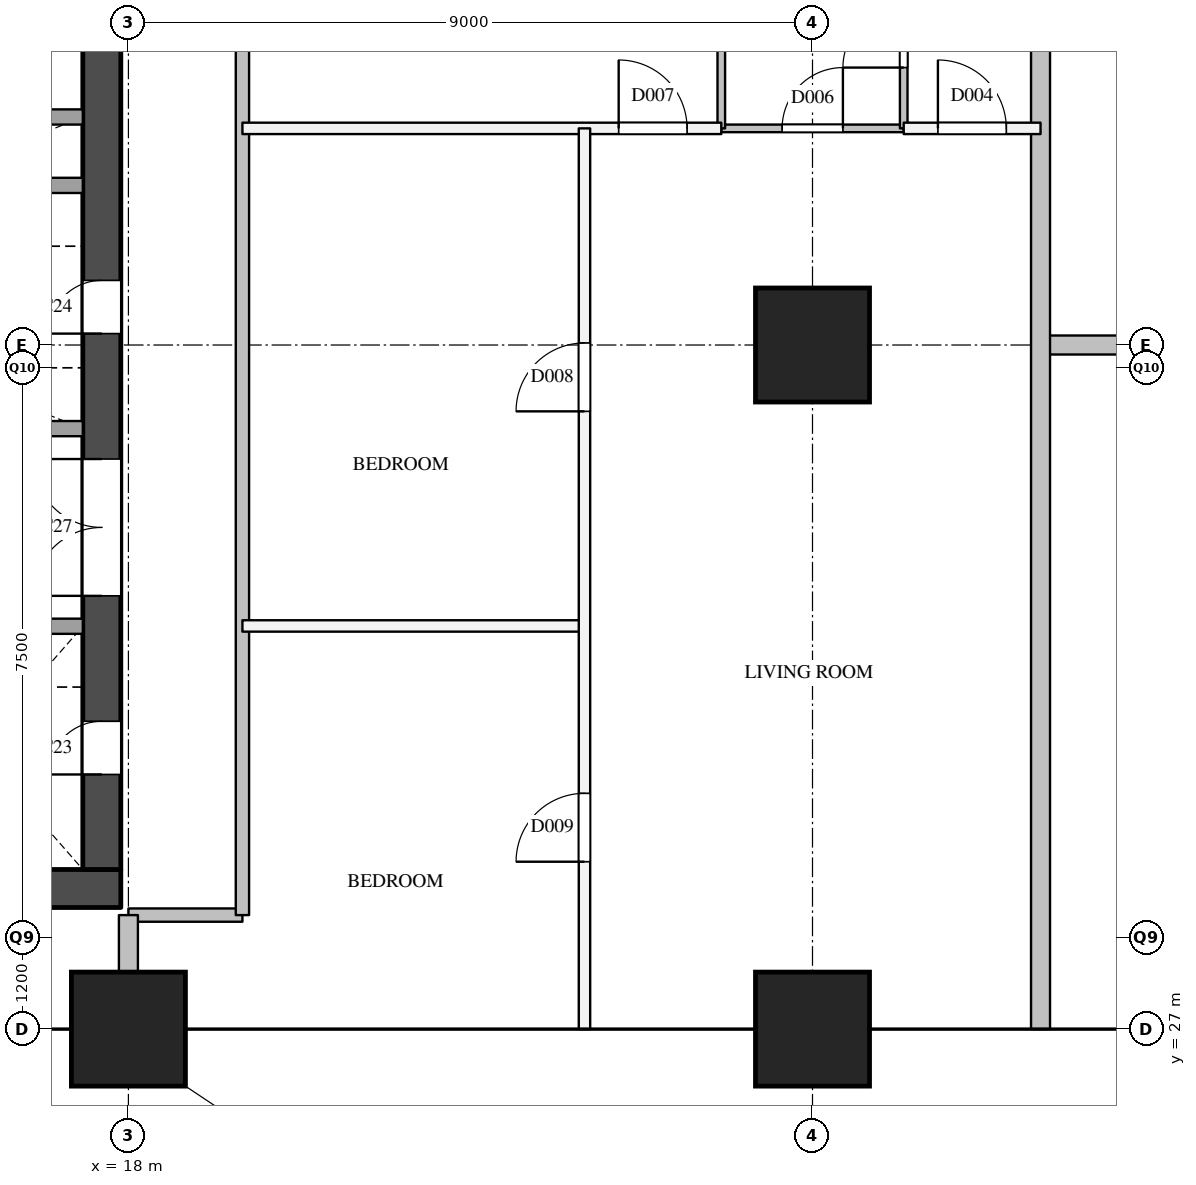
"""IFC4 building model, lengths in metres.
Left out: names, types, materials, properties, quantities, classifications, styles, units other than length and angle.
Written with IfcOpenShell. Run it as: python <this file> out.ifc"""

import sys

from ifc_helpers import new_model, si_unit, direction, frame, frame_2d, origin, origin_2d, place, context, subcontext, project, spatial, rectangle, extrude, element, fill, save


model = new_model("IFC4")
c1 = context("Model", 3, precision=1e-05, world=origin(), true_north=direction((0.0, 1.0)))
c2 = subcontext(c1, "Body", "Model", "MODEL_VIEW")
j1 = project(units=[si_unit("LENGTHUNIT", "METRE"), si_unit("PLANEANGLEUNIT", "RADIAN")], contexts=[c1])
p1 = place(None, origin())
s1 = spatial("IfcSite", under=j1, at=p1, CompositionType="ELEMENT")
p2 = place(p1, origin())
s2 = spatial("IfcBuilding", under=s1, at=p2, CompositionType="ELEMENT")
p3 = place(p2, frame((0.0, 0.0, 158.3)))
s3 = spatial("IfcBuildingStorey", under=s2, at=p3, CompositionType="ELEMENT", Elevation=158.3)
for number, where, z_axis, x_axis in (
    (1, (18.0, 27.0, 0.0), (0.0, 0.0, 1.0), (1.0, 0.0, 0.0)),
    (2, (27.0, 27.0, 0.0), (0.0, 0.0, 1.0), (1.0, 0.0, 0.0)),
    (3, (27.0, 36.0, 0.0), (0.0, 0.0, 1.0), (1.0, 0.0, 0.0)),
):
    element("IfcColumn", number, at=place(p3, frame(where, z_axis=z_axis, x_axis=x_axis)), inside=s3, PredefinedType="COLUMN", context=c2, shape_type="SweptSolid", body=[
        extrude(rectangle(XDim=1.5, YDim=1.5, at=origin_2d()), origin(), (0.0, 0.0, 1.0), 3.9),
    ])
p4 = place(p3, frame((5.7, 28.85, 0.0), z_axis=(0.0, 0.0, 1.0), x_axis=(1.0, 0.0, 0.0)))
e4 = element("IfcWall", 4, at=p4, inside=s3, PredefinedType="SHEAR", context=c2, shape_type="SweptSolid", body=[
    extrude(rectangle(XDim=12.2, YDim=0.5, at=frame_2d((6.1, 0.0))), origin(), (0.0, 0.0, 1.0), 3.6),
])
p5 = place(p4, frame((9.35, 0.0, 0.0)))
e5 = element("IfcOpeningElement", 5, at=p5, cuts=e4, PredefinedType="OPENING", context=c2, shape_type="SweptSolid", body=[
    extrude(rectangle(XDim=1.2, YDim=2.1, at=frame_2d((0.6, 1.05))), frame((0.0, 0.26, 0.0), z_axis=(0.0, -1.0, 0.0), x_axis=(1.0, 0.0, 0.0)), (0.0, 0.0, 1.0), 0.52),
])
p6 = place(p3, frame((17.65, 29.1, 0.0), z_axis=(0.0, 0.0, 1.0), x_axis=(0.0, 1.0, 0.0)))
e6 = element("IfcWall", 6, at=p6, inside=s3, PredefinedType="SHEAR", context=c2, shape_type="SweptSolid", body=[
    extrude(rectangle(XDim=20.3, YDim=0.5, at=frame_2d((10.15, 0.0))), origin(), (0.0, 0.0, 1.0), 3.6),
])
p7 = place(p6, frame((1.25, 0.0, 0.0)))
e7 = element("IfcOpeningElement", 7, at=p7, cuts=e6, PredefinedType="OPENING", context=c2, shape_type="SweptSolid", body=[
    extrude(rectangle(XDim=0.7, YDim=2.1, at=frame_2d((0.35, 1.05))), frame((0.0, 0.26, 0.0), z_axis=(0.0, -1.0, 0.0), x_axis=(1.0, 0.0, 0.0)), (0.0, 0.0, 1.0), 0.52),
])
p8 = place(p6, frame((7.05, 0.0, 0.0)))
e8 = element("IfcOpeningElement", 8, at=p8, cuts=e6, PredefinedType="OPENING", context=c2, shape_type="SweptSolid", body=[
    extrude(rectangle(XDim=0.7, YDim=2.1, at=frame_2d((0.35, 1.05))), frame((0.0, 0.26, 0.0), z_axis=(0.0, -1.0, 0.0), x_axis=(1.0, 0.0, 0.0)), (0.0, 0.0, 1.0), 0.52),
])
p9 = place(p6, frame((3.6, 0.0, 0.0)))
e9 = element("IfcOpeningElement", 9, at=p9, cuts=e6, PredefinedType="OPENING", context=c2, shape_type="SweptSolid", body=[
    extrude(rectangle(XDim=1.8, YDim=2.1, at=frame_2d((0.9, 1.05))), frame((0.0, 0.26, 0.0), z_axis=(0.0, -1.0, 0.0), x_axis=(1.0, 0.0, 0.0)), (0.0, 0.0, 1.0), 0.52),
])
for number, where, z_axis, x_axis in (
    (10, (14.6, 32.3, 0.0), (0.0, 0.0, 1.0), (1.0, 0.0, 0.0)),
    (11, (14.6, 34.9, 0.0), (0.0, 0.0, 1.0), (1.0, 0.0, 0.0)),
):
    element("IfcWall", number, at=place(p3, frame(where, z_axis=z_axis, x_axis=x_axis)), inside=s3, PredefinedType="SOLIDWALL", context=c2, shape_type="SweptSolid", body=[
        extrude(rectangle(XDim=2.8, YDim=0.2, at=frame_2d((1.4, 0.0))), origin(), (0.0, 0.0, 1.0), 3.6),
    ])
p10 = place(p3, frame((6.2, 38.1, 0.0), z_axis=(0.0, 0.0, 1.0), x_axis=(1.0, 0.0, 0.0)))
e12 = element("IfcWall", 12, at=p10, inside=s3, PredefinedType="SOLIDWALL", context=c2, shape_type="SweptSolid", body=[
    extrude(rectangle(XDim=11.2, YDim=0.2, at=frame_2d((5.6, 0.0))), origin(), (0.0, 0.0, 1.0), 3.6),
])
p11 = place(p10, frame((8.85, 0.0, 0.0)))
e13 = element("IfcOpeningElement", 13, at=p11, cuts=e12, PredefinedType="OPENING", context=c2, shape_type="SweptSolid", body=[
    extrude(rectangle(XDim=1.2, YDim=2.1, at=frame_2d((0.6, 1.05))), frame((0.0, 0.11, 0.0), z_axis=(0.0, -1.0, 0.0), x_axis=(1.0, 0.0, 0.0)), (0.0, 0.0, 1.0), 0.22),
])
p12 = place(p3, frame((12.5, 39.0, 0.0), z_axis=(0.0, 0.0, 1.0), x_axis=(1.0, 0.0, 0.0)))
e14 = element("IfcWall", 14, at=p12, inside=s3, PredefinedType="SOLIDWALL", context=c2, shape_type="SweptSolid", body=[
    extrude(rectangle(XDim=4.9, YDim=0.2, at=frame_2d((2.45, 0.0))), origin(), (0.0, 0.0, 1.0), 3.6),
])
p13 = place(p3, frame((18.0, 28.5, 0.0), z_axis=(0.0, 0.0, 1.0), x_axis=(1.0, 0.0, 0.0)))
e15 = element("IfcWall", 15, at=p13, inside=s3, PredefinedType="PARTITIONING", context=c2, shape_type="SweptSolid", body=[
    extrude(rectangle(XDim=1.5, YDim=0.175, at=frame_2d((0.75, 0.0))), origin(), (0.0, 0.0, 1.0), 3.6),
])
p14 = place(p3, frame((19.5, 28.5, 0.0), z_axis=(0.0, 0.0, 1.0), x_axis=(0.0, 1.0, 0.0)))
e16 = element("IfcWall", 16, at=p14, inside=s3, PredefinedType="PARTITIONING", context=c2, shape_type="SweptSolid", body=[
    extrude(rectangle(XDim=12.75, YDim=0.175, at=frame_2d((6.375, 0.0))), origin(), (0.0, 0.0, 1.0), 3.6),
])
p15 = place(p3, frame((19.5, 32.304, 0.0), z_axis=(0.0, 0.0, 1.0), x_axis=(1.0, 0.0, 0.0)))
e17 = element("IfcWall", 17, at=p15, inside=s3, PredefinedType="PARTITIONING", context=c2, shape_type="SweptSolid", body=[
    extrude(rectangle(XDim=4.5, YDim=0.15, at=frame_2d((2.25, 0.0))), origin(), (0.0, 0.0, 1.0), 3.6),
])
p16 = place(p3, frame((19.5, 38.85, 0.0), z_axis=(0.0, 0.0, 1.0), x_axis=(1.0, 0.0, 0.0)))
e18 = element("IfcWall", 18, at=p16, inside=s3, PredefinedType="PARTITIONING", context=c2, shape_type="SweptSolid", body=[
    extrude(rectangle(XDim=6.3, YDim=0.15, at=frame_2d((3.15, 0.0))), origin(), (0.0, 0.0, 1.0), 3.6),
])
p17 = place(p16, frame((4.95, 0.0, 0.0)))
e19 = element("IfcOpeningElement", 19, at=p17, cuts=e18, PredefinedType="OPENING", context=c2, shape_type="SweptSolid", body=[
    extrude(rectangle(XDim=0.9, YDim=2.1, at=frame_2d((0.45, 1.05))), frame((0.0, 0.085, 0.0), z_axis=(0.0, -1.0, 0.0), x_axis=(1.0, 0.0, 0.0)), (0.0, 0.0, 1.0), 0.17),
])
p18 = place(p3, frame((28.2, 38.85, 0.0), z_axis=(0.0, 0.0, 1.0), x_axis=(1.0, 0.0, 0.0)))
e20 = element("IfcWall", 20, at=p18, inside=s3, PredefinedType="PARTITIONING", context=c2, shape_type="SweptSolid", body=[
    extrude(rectangle(XDim=1.8, YDim=0.15, at=frame_2d((0.9, 0.0))), origin(), (0.0, 0.0, 1.0), 3.6),
])
p19 = place(p18, frame((0.45, 0.0, 0.0)))
e21 = element("IfcOpeningElement", 21, at=p19, cuts=e20, PredefinedType="OPENING", context=c2, shape_type="SweptSolid", body=[
    extrude(rectangle(XDim=0.9, YDim=2.1, at=frame_2d((0.45, 1.05))), frame((0.0, 0.085, 0.0), z_axis=(0.0, -1.0, 0.0), x_axis=(1.0, 0.0, 0.0)), (0.0, 0.0, 1.0), 0.17),
])
p20 = place(p3, frame((24.0, 27.0, 0.0), z_axis=(0.0, 0.0, 1.0), x_axis=(0.0, 1.0, 0.0)))
e22 = element("IfcWall", 22, at=p20, inside=s3, PredefinedType="PARTITIONING", context=c2, shape_type="SweptSolid", body=[
    extrude(rectangle(XDim=11.85, YDim=0.15, at=frame_2d((5.925, 0.0))), origin(), (0.0, 0.0, 1.0), 2.6),
])
p21 = place(p20, frame((8.127, 0.0, 0.0)))
e23 = element("IfcOpeningElement", 23, at=p21, cuts=e22, PredefinedType="OPENING", context=c2, shape_type="SweptSolid", body=[
    extrude(rectangle(XDim=0.9, YDim=2.1, at=frame_2d((0.45, 1.05))), frame((0.0, 0.085, 0.0), z_axis=(0.0, -1.0, 0.0), x_axis=(1.0, 0.0, 0.0)), (0.0, 0.0, 1.0), 0.17),
])
p22 = place(p20, frame((2.202, 0.0, 0.0)))
e24 = element("IfcOpeningElement", 24, at=p22, cuts=e22, PredefinedType="OPENING", context=c2, shape_type="SweptSolid", body=[
    extrude(rectangle(XDim=0.9, YDim=2.1, at=frame_2d((0.45, 1.05))), frame((0.0, 0.085, 0.0), z_axis=(0.0, -1.0, 0.0), x_axis=(1.0, 0.0, 0.0)), (0.0, 0.0, 1.0), 0.17),
])
p23 = place(p3, frame((30.0, 36.0, 0.0), z_axis=(0.0, 0.0, 1.0), x_axis=(1.0, 0.0, 0.0)))
e25 = element("IfcWall", 25, at=p23, inside=s3, PredefinedType="PARTITIONING", context=c2, shape_type="SweptSolid", body=[
    extrude(rectangle(XDim=4.5, YDim=0.25, at=frame_2d((2.25, 0.0))), origin(), (0.0, 0.0, 1.0), 3.6),
])
p24 = place(p3, frame((18.0, 27.0, 0.0), z_axis=(0.0, 0.0, 1.0), x_axis=(0.0, 1.0, 0.0)))
e26 = element("IfcWall", 26, at=p24, inside=s3, PredefinedType="PARTITIONING", context=c2, shape_type="SweptSolid", body=[
    extrude(rectangle(XDim=1.5, YDim=0.25, at=frame_2d((0.75, 0.0))), origin(), (0.0, 0.0, 1.0), 3.6),
])
p25 = place(p3, frame((30.0, 27.0, 0.0), z_axis=(0.0, 0.0, 1.0), x_axis=(0.0, 1.0, 0.0)))
e27 = element("IfcWall", 27, at=p25, inside=s3, PredefinedType="PARTITIONING", context=c2, shape_type="SweptSolid", body=[
    extrude(rectangle(XDim=14.25, YDim=0.25, at=frame_2d((7.125, 0.0))), origin(), (0.0, 0.0, 1.0), 2.6),
])
p26 = place(p3, frame((25.8, 38.85, 0.0), z_axis=(0.0, 0.0, 1.0), x_axis=(1.0, 0.0, 0.0)))
e28 = element("IfcWall", 28, at=p26, inside=s3, PredefinedType="PARTITIONING", context=c2, shape_type="SweptSolid", body=[
    extrude(rectangle(XDim=2.4, YDim=0.1, at=frame_2d((1.2, 0.0))), origin(), (0.0, 0.0, 1.0), 2.6),
])
p27 = place(p26, frame((0.8, 0.0, 0.0)))
e29 = element("IfcOpeningElement", 29, at=p27, cuts=e28, PredefinedType="OPENING", context=c2, shape_type="SweptSolid", body=[
    extrude(rectangle(XDim=0.8, YDim=2.1, at=frame_2d((0.4, 1.05))), frame((0.0, 0.06, 0.0), z_axis=(0.0, -1.0, 0.0), x_axis=(1.0, 0.0, 0.0)), (0.0, 0.0, 1.0), 0.12),
])
p28 = place(p3, frame((25.8, 38.85, 0.0), z_axis=(0.0, 0.0, 1.0), x_axis=(0.0, 1.0, 0.0)))
e30 = element("IfcWall", 30, at=p28, inside=s3, PredefinedType="PARTITIONING", context=c2, shape_type="SweptSolid", body=[
    extrude(rectangle(XDim=2.4, YDim=0.1, at=frame_2d((1.2, 0.0))), origin(), (0.0, 0.0, 1.0), 3.6),
])
p29 = place(p3, frame((28.2, 38.85, 0.0), z_axis=(0.0, 0.0, 1.0), x_axis=(0.0, 1.0, 0.0)))
e31 = element("IfcWall", 31, at=p29, inside=s3, PredefinedType="PARTITIONING", context=c2, shape_type="SweptSolid", body=[
    extrude(rectangle(XDim=2.4, YDim=0.1, at=frame_2d((1.2, 0.0))), origin(), (0.0, 0.0, 1.0), 3.6),
])
p30 = place(p29, frame((0.8, 0.0, 0.0)))
e32 = element("IfcOpeningElement", 32, at=p30, cuts=e31, PredefinedType="OPENING", context=c2, shape_type="SweptSolid", body=[
    extrude(rectangle(XDim=0.8, YDim=2.1, at=frame_2d((0.4, 1.05))), frame((0.0, 0.06, 0.0), z_axis=(0.0, -1.0, 0.0), x_axis=(1.0, 0.0, 0.0)), (0.0, 0.0, 1.0), 0.12),
])
p31 = place(p7, origin())
e33 = element("IfcDoor", 33, at=p31, inside=s3, OperationType="SINGLE_SWING_LEFT", PredefinedType="DOOR", context=c2, shape_type="SweptSolid", body=[
    extrude(rectangle(XDim=0.7, YDim=2.1, at=frame_2d((0.35, 1.05))), frame((0.0, 0.025, 0.0), z_axis=(0.0, -1.0, 0.0), x_axis=(1.0, 0.0, 0.0)), (0.0, 0.0, 1.0), 0.05),
])
fill(e7, e33)
p32 = place(p8, origin())
e34 = element("IfcDoor", 34, at=p32, inside=s3, OperationType="SINGLE_SWING_LEFT", PredefinedType="DOOR", context=c2, shape_type="SweptSolid", body=[
    extrude(rectangle(XDim=0.7, YDim=2.1, at=frame_2d((0.35, 1.05))), frame((0.0, 0.025, 0.0), z_axis=(0.0, -1.0, 0.0), x_axis=(1.0, 0.0, 0.0)), (0.0, 0.0, 1.0), 0.05),
])
fill(e8, e34)
p33 = place(p9, origin())
e35 = element("IfcDoor", 35, at=p33, inside=s3, OperationType="DOUBLE_DOOR_SINGLE_SWING", PredefinedType="DOOR", context=c2, shape_type="SweptSolid", body=[
    extrude(rectangle(XDim=1.8, YDim=2.1, at=frame_2d((0.9, 1.05))), frame((0.0, 0.025, 0.0), z_axis=(0.0, -1.0, 0.0), x_axis=(1.0, 0.0, 0.0)), (0.0, 0.0, 1.0), 0.05),
])
fill(e9, e35)
p34 = place(p19, origin())
e36 = element("IfcDoor", 36, at=p34, inside=s3, OperationType="SINGLE_SWING_LEFT", PredefinedType="DOOR", context=c2, shape_type="SweptSolid", body=[
    extrude(rectangle(XDim=0.9, YDim=2.1, at=frame_2d((0.45, 1.05))), frame((0.0, 0.025, 0.0), z_axis=(0.0, -1.0, 0.0), x_axis=(1.0, 0.0, 0.0)), (0.0, 0.0, 1.0), 0.05),
])
fill(e21, e36)
p35 = place(p30, origin())
e37 = element("IfcDoor", 37, at=p35, inside=s3, OperationType="SINGLE_SWING_LEFT", PredefinedType="DOOR", context=c2, shape_type="SweptSolid", body=[
    extrude(rectangle(XDim=0.8, YDim=2.1, at=frame_2d((0.4, 1.05))), frame((0.0, 0.025, 0.0), z_axis=(0.0, -1.0, 0.0), x_axis=(1.0, 0.0, 0.0)), (0.0, 0.0, 1.0), 0.05),
])
fill(e32, e37)
p36 = place(p27, origin())
e38 = element("IfcDoor", 38, at=p36, inside=s3, OperationType="SINGLE_SWING_RIGHT", PredefinedType="DOOR", context=c2, shape_type="SweptSolid", body=[
    extrude(rectangle(XDim=0.8, YDim=2.1, at=frame_2d((0.4, 1.05))), frame((0.0, 0.025, 0.0), z_axis=(0.0, -1.0, 0.0), x_axis=(1.0, 0.0, 0.0)), (0.0, 0.0, 1.0), 0.05),
])
fill(e29, e38)
p37 = place(p17, origin())
e39 = element("IfcDoor", 39, at=p37, inside=s3, OperationType="SINGLE_SWING_LEFT", PredefinedType="DOOR", context=c2, shape_type="SweptSolid", body=[
    extrude(rectangle(XDim=0.9, YDim=2.1, at=frame_2d((0.45, 1.05))), frame((0.0, 0.025, 0.0), z_axis=(0.0, -1.0, 0.0), x_axis=(1.0, 0.0, 0.0)), (0.0, 0.0, 1.0), 0.05),
])
fill(e19, e39)
p38 = place(p21, origin())
e40 = element("IfcDoor", 40, at=p38, inside=s3, OperationType="SINGLE_SWING_LEFT", PredefinedType="DOOR", context=c2, shape_type="SweptSolid", body=[
    extrude(rectangle(XDim=0.9, YDim=2.1, at=frame_2d((0.45, 1.05))), frame((0.0, 0.025, 0.0), z_axis=(0.0, -1.0, 0.0), x_axis=(1.0, 0.0, 0.0)), (0.0, 0.0, 1.0), 0.05),
])
fill(e23, e40)
p39 = place(p22, origin())
e41 = element("IfcDoor", 41, at=p39, inside=s3, OperationType="SINGLE_SWING_LEFT", PredefinedType="DOOR", context=c2, shape_type="SweptSolid", body=[
    extrude(rectangle(XDim=0.9, YDim=2.1, at=frame_2d((0.45, 1.05))), frame((0.0, 0.025, 0.0), z_axis=(0.0, -1.0, 0.0), x_axis=(1.0, 0.0, 0.0)), (0.0, 0.0, 1.0), 0.05),
])
fill(e24, e41)
save(model, sys.argv[1])
